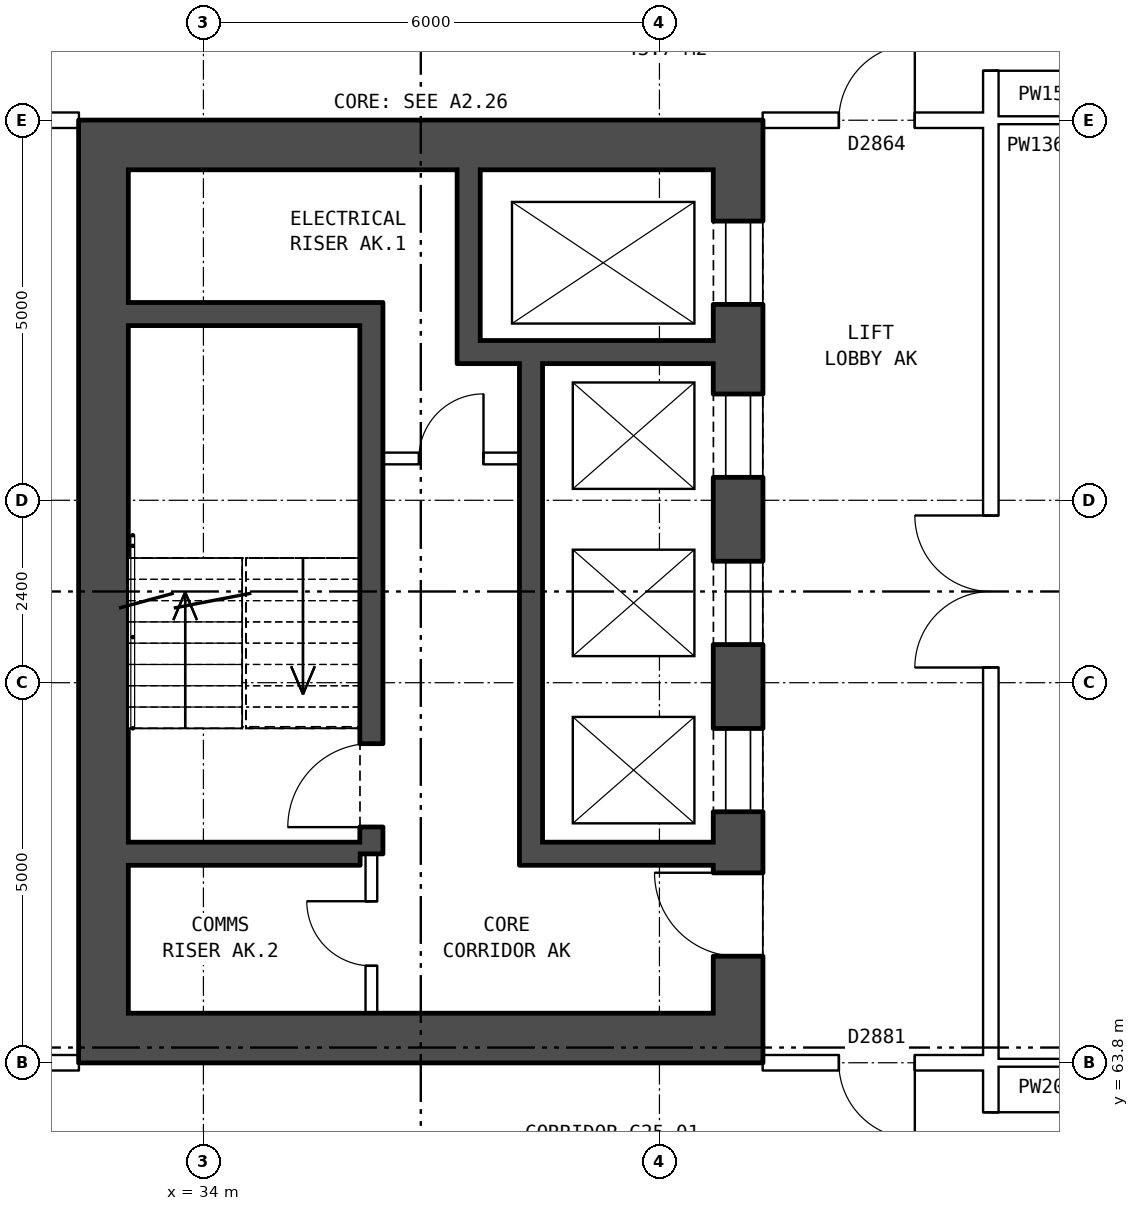
"""IFC4 building model, lengths in metres.
Left out: names, types, materials, properties, quantities, classifications, styles, units other than length and angle.
Written with IfcOpenShell. Run it as: python <this file> out.ifc"""

import sys

from ifc_helpers import new_model, si_unit, direction, frame, frame_2d, origin, place, context, subcontext, project, spatial, rectangle, extrude, element, fill, save


model = new_model("IFC4")
c1 = context("Model", 3, precision=1e-05, world=origin(), true_north=direction((0.0, 1.0)))
c2 = subcontext(c1, "Body", "Model", "MODEL_VIEW")
j1 = project(units=[si_unit("LENGTHUNIT", "METRE"), si_unit("PLANEANGLEUNIT", "RADIAN")], contexts=[c1])
p1 = place(None, origin())
s1 = spatial("IfcSite", under=j1, at=p1, CompositionType="ELEMENT")
p2 = place(p1, origin())
s2 = spatial("IfcBuilding", under=s1, at=p2, CompositionType="ELEMENT")
p3 = place(p2, frame((0.0, 0.0, 90.2)))
s3 = spatial("IfcBuildingStorey", under=s2, at=p3, CompositionType="ELEMENT", Elevation=90.2)
p4 = place(p3, frame((41.035, 75.55, 0.0), z_axis=(0.0, 0.0, 1.0), x_axis=(0.0, -1.0, 0.0)))
e1 = element("IfcWall", 1, at=p4, inside=s3, PredefinedType="SHEAR", context=c2, shape_type="SweptSolid", body=[
    extrude(rectangle(XDim=11.1, YDim=0.65, at=frame_2d((5.55, 0.0))), origin(), (0.0, 0.0, 1.0), 5.6),
])
p5 = place(p4, frame((0.675, 0.0, 0.0)))
e2 = element("IfcOpeningElement", 2, at=p5, cuts=e1, PredefinedType="OPENING", context=c2, shape_type="SweptSolid", body=[
    extrude(rectangle(XDim=1.1, YDim=2.1, at=frame_2d((0.55, 1.05))), frame((0.0, 0.335, 0.0), z_axis=(0.0, -1.0, 0.0), x_axis=(1.0, 0.0, 0.0)), (0.0, 0.0, 1.0), 0.67),
])
p6 = place(p4, frame((2.95, 0.0, 0.0)))
e3 = element("IfcOpeningElement", 3, at=p6, cuts=e1, PredefinedType="OPENING", context=c2, shape_type="SweptSolid", body=[
    extrude(rectangle(XDim=1.1, YDim=2.1, at=frame_2d((0.55, 1.05))), frame((0.0, 0.335, 0.0), z_axis=(0.0, -1.0, 0.0), x_axis=(1.0, 0.0, 0.0)), (0.0, 0.0, 1.0), 0.67),
])
p7 = place(p4, frame((5.15, 0.0, 0.0)))
e4 = element("IfcOpeningElement", 4, at=p7, cuts=e1, PredefinedType="OPENING", context=c2, shape_type="SweptSolid", body=[
    extrude(rectangle(XDim=1.1, YDim=2.1, at=frame_2d((0.55, 1.05))), frame((0.0, 0.335, 0.0), z_axis=(0.0, -1.0, 0.0), x_axis=(1.0, 0.0, 0.0)), (0.0, 0.0, 1.0), 0.67),
])
p8 = place(p4, frame((7.35, 0.0, 0.0)))
e5 = element("IfcOpeningElement", 5, at=p8, cuts=e1, PredefinedType="OPENING", context=c2, shape_type="SweptSolid", body=[
    extrude(rectangle(XDim=1.1, YDim=2.1, at=frame_2d((0.55, 1.05))), frame((0.0, 0.335, 0.0), z_axis=(0.0, -1.0, 0.0), x_axis=(1.0, 0.0, 0.0)), (0.0, 0.0, 1.0), 0.67),
])
p9 = place(p4, frame((9.25, 0.0, 0.0)))
e6 = element("IfcOpeningElement", 6, at=p9, cuts=e1, PredefinedType="OPENING", context=c2, shape_type="SweptSolid", body=[
    extrude(rectangle(XDim=1.1, YDim=2.1, at=frame_2d((0.55, 1.05))), frame((0.0, 0.335, 0.0), z_axis=(0.0, -1.0, 0.0), x_axis=(1.0, 0.0, 0.0)), (0.0, 0.0, 1.0), 0.67),
])
p10 = place(p3, frame((32.685, 75.55, 0.0), z_axis=(0.0, 0.0, 1.0), x_axis=(0.0, -1.0, 0.0)))
e7 = element("IfcWall", 7, at=p10, inside=s3, PredefinedType="SHEAR", context=c2, shape_type="SweptSolid", body=[
    extrude(rectangle(XDim=11.1, YDim=0.65, at=frame_2d((5.55, 0.0))), origin(), (0.0, 0.0, 1.0), 5.6),
])
for number, where, z_axis, x_axis in (
    (8, (41.36, 75.875, 0.0), (0.0, 0.0, 1.0), (-1.0, 0.0, 0.0)),
    (9, (41.36, 64.125, 0.0), (0.0, 0.0, 1.0), (-1.0, 0.0, 0.0)),
):
    element("IfcWall", number, at=place(p3, frame(where, z_axis=z_axis, x_axis=x_axis)), inside=s3, PredefinedType="SHEAR", context=c2, shape_type="SweptSolid", body=[
        extrude(rectangle(XDim=9.0, YDim=0.65, at=frame_2d((4.5, 0.0))), origin(), (0.0, 0.0, 1.0), 5.6),
    ])
p11 = place(p3, frame((36.06, 73.65, 0.0), z_axis=(0.0, 0.0, 1.0), x_axis=(-1.0, 0.0, 0.0)))
e10 = element("IfcWall", 10, at=p11, inside=s3, PredefinedType="SHEAR", context=c2, shape_type="SweptSolid", body=[
    extrude(rectangle(XDim=3.05, YDim=0.3, at=frame_2d((1.525, 0.0))), origin(), (0.0, 0.0, 1.0), 5.6),
])
p12 = place(p3, frame((40.71, 73.15, 0.0), z_axis=(0.0, 0.0, 1.0), x_axis=(-1.0, 0.0, 0.0)))
e11 = element("IfcWall", 11, at=p12, inside=s3, PredefinedType="SHEAR", context=c2, shape_type="SweptSolid", body=[
    extrude(rectangle(XDim=3.37, YDim=0.3, at=frame_2d((1.685, 0.0))), origin(), (0.0, 0.0, 1.0), 5.6),
])
p13 = place(p3, frame((38.16, 71.75, 0.0), z_axis=(0.0, 0.0, 1.0), x_axis=(-1.0, 0.0, 0.0)))
e12 = element("IfcWall", 12, at=p13, inside=s3, PredefinedType="PARTITIONING", context=c2, shape_type="SweptSolid", body=[
    extrude(rectangle(XDim=1.8, YDim=0.15, at=frame_2d((0.9, 0.0))), origin(), (0.0, 0.0, 1.0), 5.6),
])
p14 = place(p13, frame((0.475, 0.0, 0.0)))
e13 = element("IfcOpeningElement", 13, at=p14, cuts=e12, PredefinedType="OPENING", context=c2, shape_type="SweptSolid", body=[
    extrude(rectangle(XDim=0.85, YDim=2.1, at=frame_2d((0.425, 1.05))), frame((0.0, 0.085, 0.0), z_axis=(0.0, -1.0, 0.0), x_axis=(1.0, 0.0, 0.0)), (0.0, 0.0, 1.0), 0.17),
])
p15 = place(p3, frame((40.71, 66.55, 0.0), z_axis=(0.0, 0.0, 1.0), x_axis=(-1.0, 0.0, 0.0)))
e14 = element("IfcWall", 14, at=p15, inside=s3, PredefinedType="SHEAR", context=c2, shape_type="SweptSolid", body=[
    extrude(rectangle(XDim=2.25, YDim=0.3, at=frame_2d((1.125, 0.0))), origin(), (0.0, 0.0, 1.0), 5.6),
])
p16 = place(p3, frame((36.06, 66.55, 0.0), z_axis=(0.0, 0.0, 1.0), x_axis=(-1.0, 0.0, 0.0)))
e15 = element("IfcWall", 15, at=p16, inside=s3, PredefinedType="SHEAR", context=c2, shape_type="SweptSolid", body=[
    extrude(rectangle(XDim=3.05, YDim=0.3, at=frame_2d((1.525, 0.0))), origin(), (0.0, 0.0, 1.0), 5.6),
])
p17 = place(p3, frame((38.31, 73.0, 0.0), z_axis=(0.0, 0.0, 1.0), x_axis=(0.0, -1.0, 0.0)))
e16 = element("IfcWall", 16, at=p17, inside=s3, PredefinedType="SHEAR", context=c2, shape_type="SweptSolid", body=[
    extrude(rectangle(XDim=6.6, YDim=0.3, at=frame_2d((3.3, 0.0))), origin(), (0.0, 0.0, 1.0), 5.6),
])
p18 = place(p3, frame((37.49, 75.55, 0.0), z_axis=(0.0, 0.0, 1.0), x_axis=(0.0, -1.0, 0.0)))
e17 = element("IfcWall", 17, at=p18, inside=s3, PredefinedType="SHEAR", context=c2, shape_type="SweptSolid", body=[
    extrude(rectangle(XDim=2.25, YDim=0.3, at=frame_2d((1.125, 0.0))), origin(), (0.0, 0.0, 1.0), 5.6),
])
p19 = place(p3, frame((36.21, 73.8, 0.0), z_axis=(0.0, 0.0, 1.0), x_axis=(0.0, -1.0, 0.0)))
e18 = element("IfcWall", 18, at=p19, inside=s3, PredefinedType="SHEAR", context=c2, shape_type="SweptSolid", body=[
    extrude(rectangle(XDim=7.25, YDim=0.3, at=frame_2d((3.625, 0.0))), origin(), (0.0, 0.0, 1.0), 5.6),
])
p20 = place(p19, frame((5.8, 0.0, 0.0)))
e19 = element("IfcOpeningElement", 19, at=p20, cuts=e18, PredefinedType="OPENING", context=c2, shape_type="SweptSolid", body=[
    extrude(rectangle(XDim=1.1, YDim=2.1, at=frame_2d((0.55, 1.05))), frame((0.0, 0.16, 0.0), z_axis=(0.0, -1.0, 0.0), x_axis=(1.0, 0.0, 0.0)), (0.0, 0.0, 1.0), 0.32),
])
p21 = place(p3, frame((36.21, 66.55, 0.0), z_axis=(0.0, 0.0, 1.0), x_axis=(0.0, -1.0, 0.0)))
e20 = element("IfcWall", 20, at=p21, inside=s3, PredefinedType="PARTITIONING", context=c2, shape_type="SweptSolid", body=[
    extrude(rectangle(XDim=2.1, YDim=0.15, at=frame_2d((1.05, 0.0))), origin(), (0.0, 0.0, 1.0), 5.6),
])
p22 = place(p21, frame((0.625, 0.0, 0.0)))
e21 = element("IfcOpeningElement", 21, at=p22, cuts=e20, PredefinedType="OPENING", context=c2, shape_type="SweptSolid", body=[
    extrude(rectangle(XDim=0.85, YDim=2.1, at=frame_2d((0.425, 1.05))), frame((0.0, 0.085, 0.0), z_axis=(0.0, -1.0, 0.0), x_axis=(1.0, 0.0, 0.0)), (0.0, 0.0, 1.0), 0.17),
])
p23 = place(p3, frame((44.36, 63.9, 0.0), z_axis=(0.0, 0.0, 1.0), x_axis=(0.0, 1.0, 0.0)))
e22 = element("IfcWall", 22, at=p23, inside=s3, PredefinedType="PARTITIONING", context=c2, shape_type="SweptSolid", body=[
    extrude(rectangle(XDim=12.2, YDim=0.2, at=frame_2d((6.1, 0.0))), origin(), (0.0, 0.0, 1.0), 5.6),
])
p24 = place(p23, frame((5.1, 0.0, 0.0)))
e23 = element("IfcOpeningElement", 23, at=p24, cuts=e22, PredefinedType="OPENING", context=c2, shape_type="SweptSolid", body=[
    extrude(rectangle(XDim=2.0, YDim=2.1, at=frame_2d((1.0, 1.05))), frame((0.0, 0.11, 0.0), z_axis=(0.0, -1.0, 0.0), x_axis=(1.0, 0.0, 0.0)), (0.0, 0.0, 1.0), 0.22),
])
p25 = place(p3, frame((25.24, 63.8, 0.0), z_axis=(0.0, 0.0, 1.0), x_axis=(1.0, 0.0, 0.0)))
e24 = element("IfcWall", 24, at=p25, inside=s3, PredefinedType="PARTITIONING", context=c2, shape_type="SweptSolid", body=[
    extrude(rectangle(XDim=7.12, YDim=0.2, at=frame_2d((3.56, 0.0))), origin(), (0.0, 0.0, 1.0), 5.6),
])
p26 = place(p25, frame((3.02, 0.0, 0.0)))
e25 = element("IfcOpeningElement", 25, at=p26, cuts=e24, PredefinedType="OPENING", context=c2, shape_type="SweptSolid", body=[
    extrude(rectangle(XDim=1.2, YDim=2.1, at=frame_2d((0.6, 1.05))), frame((0.0, 0.11, 0.0), z_axis=(0.0, -1.0, 0.0), x_axis=(1.0, 0.0, 0.0)), (0.0, 0.0, 1.0), 0.22),
])
p27 = place(p3, frame((41.36, 63.8, 0.0), z_axis=(0.0, 0.0, 1.0), x_axis=(1.0, 0.0, 0.0)))
e26 = element("IfcWall", 26, at=p27, inside=s3, PredefinedType="PARTITIONING", context=c2, shape_type="SweptSolid", body=[
    extrude(rectangle(XDim=3.1, YDim=0.2, at=frame_2d((1.55, 0.0))), origin(), (0.0, 0.0, 1.0), 5.6),
])
p28 = place(p27, frame((1.0, 0.0, 0.0)))
e27 = element("IfcOpeningElement", 27, at=p28, cuts=e26, PredefinedType="OPENING", context=c2, shape_type="SweptSolid", body=[
    extrude(rectangle(XDim=1.0, YDim=2.1, at=frame_2d((0.5, 1.05))), frame((0.0, 0.11, 0.0), z_axis=(0.0, -1.0, 0.0), x_axis=(1.0, 0.0, 0.0)), (0.0, 0.0, 1.0), 0.22),
])
p29 = place(p3, frame((44.26, 63.8, 0.0), z_axis=(0.0, 0.0, 1.0), x_axis=(1.0, 0.0, 0.0)))
e28 = element("IfcWall", 28, at=p29, inside=s3, PredefinedType="PARTITIONING", context=c2, shape_type="SweptSolid", body=[
    extrude(rectangle(XDim=19.38, YDim=0.1, at=frame_2d((9.69, 0.0))), origin(), (0.0, 0.0, 1.0), 5.6),
])
p30 = place(p29, frame((4.42, 0.0, 0.0)))
e29 = element("IfcOpeningElement", 29, at=p30, cuts=e28, PredefinedType="OPENING", context=c2, shape_type="SweptSolid", body=[
    extrude(rectangle(XDim=1.0, YDim=2.1, at=frame_2d((0.5, 1.05))), frame((0.0, 0.06, 0.0), z_axis=(0.0, -1.0, 0.0), x_axis=(1.0, 0.0, 0.0)), (0.0, 0.0, 1.0), 0.12),
])
p31 = place(p29, frame((14.06, 0.0, 0.0)))
e30 = element("IfcOpeningElement", 30, at=p31, cuts=e28, PredefinedType="OPENING", context=c2, shape_type="SweptSolid", body=[
    extrude(rectangle(XDim=1.0, YDim=2.1, at=frame_2d((0.5, 1.05))), frame((0.0, 0.06, 0.0), z_axis=(0.0, -1.0, 0.0), x_axis=(1.0, 0.0, 0.0)), (0.0, 0.0, 1.0), 0.12),
])
p32 = place(p3, frame((25.24, 76.2, 0.0), z_axis=(0.0, 0.0, 1.0), x_axis=(1.0, 0.0, 0.0)))
e31 = element("IfcWall", 31, at=p32, inside=s3, PredefinedType="PARTITIONING", context=c2, shape_type="SweptSolid", body=[
    extrude(rectangle(XDim=7.12, YDim=0.2, at=frame_2d((3.56, 0.0))), origin(), (0.0, 0.0, 1.0), 5.6),
])
p33 = place(p3, frame((41.36, 76.2, 0.0), z_axis=(0.0, 0.0, 1.0), x_axis=(1.0, 0.0, 0.0)))
e32 = element("IfcWall", 32, at=p33, inside=s3, PredefinedType="PARTITIONING", context=c2, shape_type="SweptSolid", body=[
    extrude(rectangle(XDim=3.1, YDim=0.2, at=frame_2d((1.55, 0.0))), origin(), (0.0, 0.0, 1.0), 5.6),
])
p34 = place(p33, frame((1.0, 0.0, 0.0)))
e33 = element("IfcOpeningElement", 33, at=p34, cuts=e32, PredefinedType="OPENING", context=c2, shape_type="SweptSolid", body=[
    extrude(rectangle(XDim=1.0, YDim=2.1, at=frame_2d((0.5, 1.05))), frame((0.0, 0.11, 0.0), z_axis=(0.0, -1.0, 0.0), x_axis=(1.0, 0.0, 0.0)), (0.0, 0.0, 1.0), 0.22),
])
p35 = place(p3, frame((44.26, 76.2, 0.0), z_axis=(0.0, 0.0, 1.0), x_axis=(1.0, 0.0, 0.0)))
e34 = element("IfcWall", 34, at=p35, inside=s3, PredefinedType="PARTITIONING", context=c2, shape_type="SweptSolid", body=[
    extrude(rectangle(XDim=19.38, YDim=0.1, at=frame_2d((9.69, 0.0))), origin(), (0.0, 0.0, 1.0), 5.6),
])
p36 = place(p35, frame((4.42, 0.0, 0.0)))
e35 = element("IfcOpeningElement", 35, at=p36, cuts=e34, PredefinedType="OPENING", context=c2, shape_type="SweptSolid", body=[
    extrude(rectangle(XDim=1.0, YDim=2.1, at=frame_2d((0.5, 1.05))), frame((0.0, 0.06, 0.0), z_axis=(0.0, -1.0, 0.0), x_axis=(1.0, 0.0, 0.0)), (0.0, 0.0, 1.0), 0.12),
])
p37 = place(p35, frame((14.06, 0.0, 0.0)))
e36 = element("IfcOpeningElement", 36, at=p37, cuts=e34, PredefinedType="OPENING", context=c2, shape_type="SweptSolid", body=[
    extrude(rectangle(XDim=1.0, YDim=2.1, at=frame_2d((0.5, 1.05))), frame((0.0, 0.06, 0.0), z_axis=(0.0, -1.0, 0.0), x_axis=(1.0, 0.0, 0.0)), (0.0, 0.0, 1.0), 0.12),
])
p38 = place(p3, frame((44.36, 61.398, 0.0), z_axis=(0.0, 0.0, 1.0), x_axis=(0.0, 1.0, 0.0)))
e37 = element("IfcWall", 37, at=p38, inside=s3, PredefinedType="PARTITIONING", context=c2, shape_type="SweptSolid", body=[
    extrude(rectangle(XDim=2.502, YDim=0.2, at=frame_2d((1.251, 0.0))), origin(), (0.0, 0.0, 1.0), 5.6),
])
p39 = place(p38, frame((0.751, 0.0, 0.0)))
e38 = element("IfcOpeningElement", 38, at=p39, cuts=e37, PredefinedType="OPENING", context=c2, shape_type="SweptSolid", body=[
    extrude(rectangle(XDim=1.0, YDim=2.1, at=frame_2d((0.5, 1.05))), frame((0.0, 0.11, 0.0), z_axis=(0.0, -1.0, 0.0), x_axis=(1.0, 0.0, 0.0)), (0.0, 0.0, 1.0), 0.22),
])
p40 = place(p3, frame((44.36, 76.1, 0.0), z_axis=(0.0, 0.0, 1.0), x_axis=(0.0, 1.0, 0.0)))
e39 = element("IfcWall", 39, at=p40, inside=s3, PredefinedType="PARTITIONING", context=c2, shape_type="SweptSolid", body=[
    extrude(rectangle(XDim=2.502, YDim=0.2, at=frame_2d((1.251, 0.0))), origin(), (0.0, 0.0, 1.0), 5.6),
])
p41 = place(p40, frame((0.751, 0.0, 0.0)))
e40 = element("IfcOpeningElement", 40, at=p41, cuts=e39, PredefinedType="OPENING", context=c2, shape_type="SweptSolid", body=[
    extrude(rectangle(XDim=1.0, YDim=2.1, at=frame_2d((0.5, 1.05))), frame((0.0, 0.11, 0.0), z_axis=(0.0, -1.0, 0.0), x_axis=(1.0, 0.0, 0.0)), (0.0, 0.0, 1.0), 0.22),
])
p42 = place(p5, origin())
e41 = element("IfcDoor", 41, at=p42, inside=s3, OperationType="DOUBLE_DOOR_SLIDING", PredefinedType="DOOR", context=c2, shape_type="SweptSolid", body=[
    extrude(rectangle(XDim=1.1, YDim=2.1, at=frame_2d((0.55, 1.05))), frame((0.0, -0.26, 0.0), z_axis=(0.0, -1.0, 0.0), x_axis=(1.0, 0.0, 0.0)), (0.0, 0.0, 1.0), 0.05),
])
fill(e2, e41)
p43 = place(p6, origin())
e42 = element("IfcDoor", 42, at=p43, inside=s3, OperationType="DOUBLE_DOOR_SLIDING", PredefinedType="DOOR", context=c2, shape_type="SweptSolid", body=[
    extrude(rectangle(XDim=1.1, YDim=2.1, at=frame_2d((0.55, 1.05))), frame((0.0, -0.26, 0.0), z_axis=(0.0, -1.0, 0.0), x_axis=(1.0, 0.0, 0.0)), (0.0, 0.0, 1.0), 0.05),
])
fill(e3, e42)
p44 = place(p7, origin())
e43 = element("IfcDoor", 43, at=p44, inside=s3, OperationType="DOUBLE_DOOR_SLIDING", PredefinedType="DOOR", context=c2, shape_type="SweptSolid", body=[
    extrude(rectangle(XDim=1.1, YDim=2.1, at=frame_2d((0.55, 1.05))), frame((0.0, -0.26, 0.0), z_axis=(0.0, -1.0, 0.0), x_axis=(1.0, 0.0, 0.0)), (0.0, 0.0, 1.0), 0.05),
])
fill(e4, e43)
p45 = place(p8, origin())
e44 = element("IfcDoor", 44, at=p45, inside=s3, OperationType="DOUBLE_DOOR_SLIDING", PredefinedType="DOOR", context=c2, shape_type="SweptSolid", body=[
    extrude(rectangle(XDim=1.1, YDim=2.1, at=frame_2d((0.55, 1.05))), frame((0.0, -0.26, 0.0), z_axis=(0.0, -1.0, 0.0), x_axis=(1.0, 0.0, 0.0)), (0.0, 0.0, 1.0), 0.05),
])
fill(e5, e44)
p46 = place(p9, frame((1.1, 0.0, 0.0), z_axis=(0.0, 0.0, 1.0), x_axis=(-1.0, 0.0, 0.0)))
e45 = element("IfcDoor", 45, at=p46, inside=s3, OperationType="SINGLE_SWING_RIGHT", PredefinedType="DOOR", context=c2, shape_type="SweptSolid", body=[
    extrude(rectangle(XDim=1.1, YDim=2.1, at=frame_2d((0.55, 1.05))), frame((0.0, 0.31, 0.0), z_axis=(0.0, -1.0, 0.0), x_axis=(1.0, 0.0, 0.0)), (0.0, 0.0, 1.0), 0.05),
])
fill(e6, e45)
p47 = place(p20, frame((1.1, 0.0, 0.0), z_axis=(0.0, 0.0, 1.0), x_axis=(-1.0, 0.0, 0.0)))
e46 = element("IfcDoor", 46, at=p47, inside=s3, OperationType="SINGLE_SWING_LEFT", PredefinedType="DOOR", context=c2, shape_type="SweptSolid", body=[
    extrude(rectangle(XDim=1.1, YDim=2.1, at=frame_2d((0.55, 1.05))), frame((0.0, 0.025, 0.0), z_axis=(0.0, -1.0, 0.0), x_axis=(1.0, 0.0, 0.0)), (0.0, 0.0, 1.0), 0.05),
])
fill(e19, e46)
p48 = place(p14, frame((0.85, 0.0, 0.0), z_axis=(0.0, 0.0, 1.0), x_axis=(-1.0, 0.0, 0.0)))
e47 = element("IfcDoor", 47, at=p48, inside=s3, OperationType="SINGLE_SWING_RIGHT", PredefinedType="DOOR", context=c2, shape_type="SweptSolid", body=[
    extrude(rectangle(XDim=0.85, YDim=2.1, at=frame_2d((0.425, 1.05))), frame((0.0, 0.025, 0.0), z_axis=(0.0, -1.0, 0.0), x_axis=(1.0, 0.0, 0.0)), (0.0, 0.0, 1.0), 0.05),
])
fill(e13, e47)
p49 = place(p22, frame((0.85, 0.0, 0.0), z_axis=(0.0, 0.0, 1.0), x_axis=(-1.0, 0.0, 0.0)))
e48 = element("IfcDoor", 48, at=p49, inside=s3, OperationType="SINGLE_SWING_RIGHT", PredefinedType="DOOR", context=c2, shape_type="SweptSolid", body=[
    extrude(rectangle(XDim=0.85, YDim=2.1, at=frame_2d((0.425, 1.05))), frame((0.0, 0.025, 0.0), z_axis=(0.0, -1.0, 0.0), x_axis=(1.0, 0.0, 0.0)), (0.0, 0.0, 1.0), 0.05),
])
fill(e21, e48)
p50 = place(p24, origin())
e49 = element("IfcDoor", 49, at=p50, inside=s3, OperationType="DOUBLE_DOOR_SINGLE_SWING", PredefinedType="DOOR", context=c2, shape_type="SweptSolid", body=[
    extrude(rectangle(XDim=2.0, YDim=2.1, at=frame_2d((1.0, 1.05))), frame((0.0, 0.025, 0.0), z_axis=(0.0, -1.0, 0.0), x_axis=(1.0, 0.0, 0.0)), (0.0, 0.0, 1.0), 0.05),
])
fill(e23, e49)
p51 = place(p28, frame((1.0, 0.0, 0.0), z_axis=(0.0, 0.0, 1.0), x_axis=(-1.0, 0.0, 0.0)))
e50 = element("IfcDoor", 50, at=p51, inside=s3, OperationType="SINGLE_SWING_LEFT", PredefinedType="DOOR", context=c2, shape_type="SweptSolid", body=[
    extrude(rectangle(XDim=1.0, YDim=2.1, at=frame_2d((0.5, 1.05))), frame((0.0, 0.025, 0.0), z_axis=(0.0, -1.0, 0.0), x_axis=(1.0, 0.0, 0.0)), (0.0, 0.0, 1.0), 0.05),
])
fill(e27, e50)
p52 = place(p34, origin())
e51 = element("IfcDoor", 51, at=p52, inside=s3, OperationType="SINGLE_SWING_RIGHT", PredefinedType="DOOR", context=c2, shape_type="SweptSolid", body=[
    extrude(rectangle(XDim=1.0, YDim=2.1, at=frame_2d((0.5, 1.05))), frame((0.0, 0.025, 0.0), z_axis=(0.0, -1.0, 0.0), x_axis=(1.0, 0.0, 0.0)), (0.0, 0.0, 1.0), 0.05),
])
fill(e33, e51)
p53 = place(p39, frame((1.0, 0.0, 0.0), z_axis=(0.0, 0.0, 1.0), x_axis=(-1.0, 0.0, 0.0)))
e52 = element("IfcDoor", 52, at=p53, inside=s3, OperationType="SINGLE_SWING_LEFT", PredefinedType="DOOR", context=c2, shape_type="SweptSolid", body=[
    extrude(rectangle(XDim=1.0, YDim=2.1, at=frame_2d((0.5, 1.05))), frame((0.0, 0.025, 0.0), z_axis=(0.0, -1.0, 0.0), x_axis=(1.0, 0.0, 0.0)), (0.0, 0.0, 1.0), 0.05),
])
fill(e38, e52)
p54 = place(p41, frame((1.0, 0.0, 0.0), z_axis=(0.0, 0.0, 1.0), x_axis=(-1.0, 0.0, 0.0)))
e53 = element("IfcDoor", 53, at=p54, inside=s3, OperationType="SINGLE_SWING_RIGHT", PredefinedType="DOOR", context=c2, shape_type="SweptSolid", body=[
    extrude(rectangle(XDim=1.0, YDim=2.1, at=frame_2d((0.5, 1.05))), frame((0.0, 0.025, 0.0), z_axis=(0.0, -1.0, 0.0), x_axis=(1.0, 0.0, 0.0)), (0.0, 0.0, 1.0), 0.05),
])
fill(e40, e53)
save(model, sys.argv[1])
